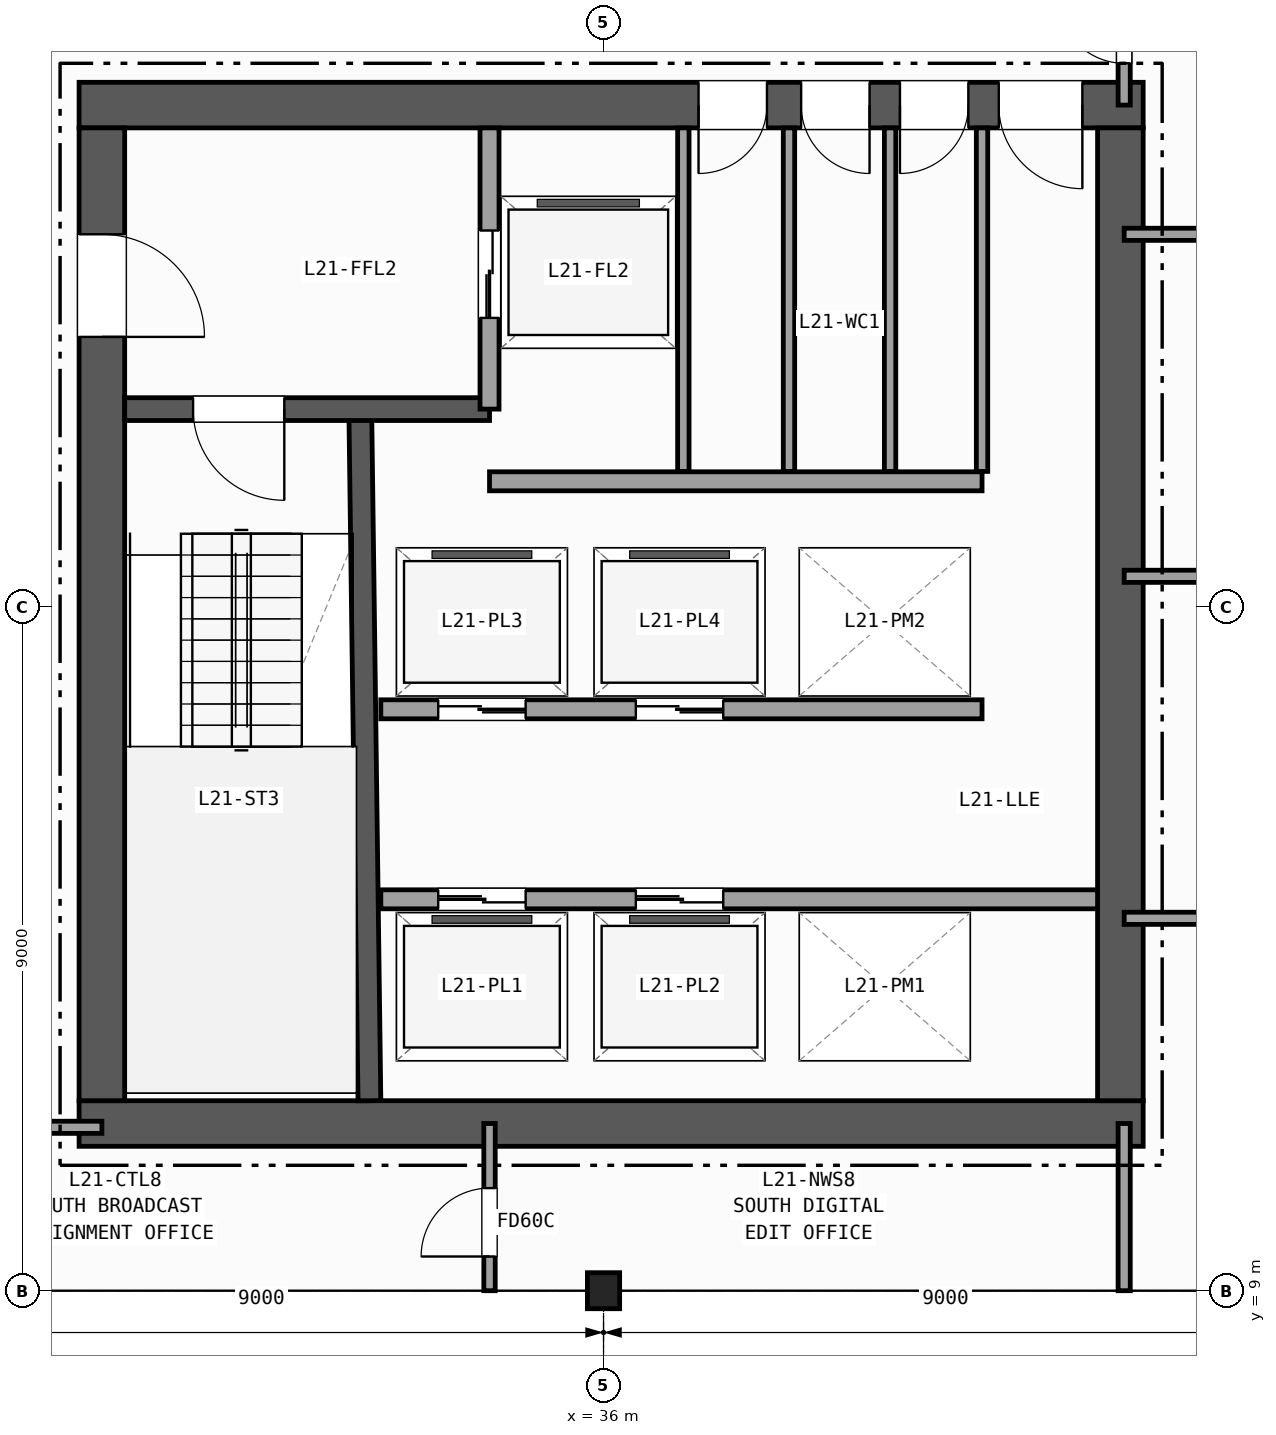
"""IFC4 building model, lengths in metres.
Left out: names, types, materials, properties, quantities, classifications, styles, units other than length and angle.
Written with IfcOpenShell. Run it as: python <this file> out.ifc"""

import sys

from ifc_helpers import new_model, si_unit, direction, frame, frame_2d, origin, origin_2d, place, context, subcontext, project, spatial, rectangle, i_section, extrude, element, fill, save


model = new_model("IFC4")
c1 = context("Model", 3, precision=1e-05, world=origin(), true_north=direction((0.0, 1.0)))
c2 = subcontext(c1, "Body", "Model", "MODEL_VIEW")
j1 = project(units=[si_unit("LENGTHUNIT", "METRE"), si_unit("PLANEANGLEUNIT", "RADIAN")], contexts=[c1])
p1 = place(None, origin())
s1 = spatial("IfcSite", under=j1, at=p1, CompositionType="ELEMENT")
p2 = place(p1, origin())
s2 = spatial("IfcBuilding", under=s1, at=p2, CompositionType="ELEMENT")
p3 = place(p2, frame((0.0, 0.0, 89.1)))
s3 = spatial("IfcBuildingStorey", under=s2, at=p3, CompositionType="ELEMENT", Elevation=89.1)
p4 = place(p3, frame((36.0, 9.0, 0.0), z_axis=(0.0, 0.0, 1.0), x_axis=(1.0, 0.0, 0.0)))
e1 = element("IfcColumn", 1, at=p4, inside=s3, PredefinedType="COLUMN", context=c2, shape_type="SweptSolid", body=[
    extrude(i_section(OverallWidth=0.424, OverallDepth=0.474, WebThickness=0.048, FlangeThickness=0.077, FilletRadius=0.015, at=origin_2d()), origin(), (0.0, 0.0, 1.0), 3.7),
])
p5 = place(p3, frame((29.1, 11.2, 0.0), z_axis=(0.0, 0.0, 1.0), x_axis=(1.0, 0.0, 0.0)))
e2 = element("IfcWall", 2, at=p5, inside=s3, PredefinedType="SHEAR", context=c2, shape_type="SweptSolid", body=[
    extrude(rectangle(XDim=14.0, YDim=0.6, at=frame_2d((7.0, 0.0))), origin(), (0.0, 0.0, 1.0), 3.42),
])
p6 = place(p3, frame((43.1, 24.6, 0.0), z_axis=(0.0, 0.0, 1.0), x_axis=(-1.0, 0.0, 0.0)))
e3 = element("IfcWall", 3, at=p6, inside=s3, PredefinedType="SHEAR", context=c2, shape_type="SweptSolid", body=[
    extrude(rectangle(XDim=14.0, YDim=0.6, at=frame_2d((7.0, 0.0))), origin(), (0.0, 0.0, 1.0), 3.42),
])
p7 = place(p6, frame((0.8, 0.0, 0.0)))
e4 = element("IfcOpeningElement", 4, at=p7, cuts=e3, PredefinedType="OPENING", context=c2, shape_type="SweptSolid", body=[
    extrude(rectangle(XDim=1.1, YDim=2.15, at=frame_2d((0.55, 1.075))), frame((0.0, 0.31, 0.0), z_axis=(0.0, -1.0, 0.0), x_axis=(1.0, 0.0, 0.0)), (0.0, 0.0, 1.0), 0.62),
])
p8 = place(p6, frame((2.3, 0.0, 0.0)))
e5 = element("IfcOpeningElement", 5, at=p8, cuts=e3, PredefinedType="OPENING", context=c2, shape_type="SweptSolid", body=[
    extrude(rectangle(XDim=0.9, YDim=2.1, at=frame_2d((0.45, 1.05))), frame((0.0, 0.31, 0.0), z_axis=(0.0, -1.0, 0.0), x_axis=(1.0, 0.0, 0.0)), (0.0, 0.0, 1.0), 0.62),
])
p9 = place(p6, frame((3.6, 0.0, 0.0)))
e6 = element("IfcOpeningElement", 6, at=p9, cuts=e3, PredefinedType="OPENING", context=c2, shape_type="SweptSolid", body=[
    extrude(rectangle(XDim=0.9, YDim=2.1, at=frame_2d((0.45, 1.05))), frame((0.0, 0.31, 0.0), z_axis=(0.0, -1.0, 0.0), x_axis=(1.0, 0.0, 0.0)), (0.0, 0.0, 1.0), 0.62),
])
p10 = place(p6, frame((4.95, 0.0, 0.0)))
e7 = element("IfcOpeningElement", 7, at=p10, cuts=e3, PredefinedType="OPENING", context=c2, shape_type="SweptSolid", body=[
    extrude(rectangle(XDim=0.9, YDim=2.1, at=frame_2d((0.45, 1.05))), frame((0.0, 0.31, 0.0), z_axis=(0.0, -1.0, 0.0), x_axis=(1.0, 0.0, 0.0)), (0.0, 0.0, 1.0), 0.62),
])
p11 = place(p3, frame((29.4, 24.3, 0.0), z_axis=(0.0, 0.0, 1.0), x_axis=(0.0, -1.0, 0.0)))
e8 = element("IfcWall", 8, at=p11, inside=s3, PredefinedType="SHEAR", context=c2, shape_type="SweptSolid", body=[
    extrude(rectangle(XDim=12.8, YDim=0.6, at=frame_2d((6.4, 0.0))), origin(), (0.0, 0.0, 1.0), 3.42),
])
p12 = place(p11, frame((1.4, 0.0, 0.0)))
e9 = element("IfcOpeningElement", 9, at=p12, cuts=e8, PredefinedType="OPENING", context=c2, shape_type="SweptSolid", body=[
    extrude(rectangle(XDim=1.35, YDim=2.15, at=frame_2d((0.675, 1.075))), frame((0.0, 0.31, 0.0), z_axis=(0.0, -1.0, 0.0), x_axis=(1.0, 0.0, 0.0)), (0.0, 0.0, 1.0), 0.62),
])
p13 = place(p3, frame((42.8, 11.5, 0.0), z_axis=(0.0, 0.0, 1.0), x_axis=(0.0, 1.0, 0.0)))
e10 = element("IfcWall", 10, at=p13, inside=s3, PredefinedType="SHEAR", context=c2, shape_type="SweptSolid", body=[
    extrude(rectangle(XDim=12.8, YDim=0.6, at=frame_2d((6.4, 0.0))), origin(), (0.0, 0.0, 1.0), 3.42),
])
p14 = place(p3, frame((32.92, 11.5, 0.0), z_axis=(0.0, 0.0, 1.0), x_axis=(-0.013244407292, 0.999912288991, 0.0)))
e11 = element("IfcWall", 11, at=p14, inside=s3, PredefinedType="SHEAR", context=c2, shape_type="SweptSolid", body=[
    extrude(rectangle(XDim=9.051, YDim=0.3, at=frame_2d((4.525, 0.0))), origin(), (0.0, 0.0, 1.0), 3.42),
])
p15 = place(p3, frame((34.5, 20.6, 0.0), z_axis=(0.0, 0.0, 1.0), x_axis=(-1.0, 0.0, 0.0)))
e12 = element("IfcWall", 12, at=p15, inside=s3, PredefinedType="SHEAR", context=c2, shape_type="SweptSolid", body=[
    extrude(rectangle(XDim=4.8, YDim=0.3, at=frame_2d((2.4, 0.0))), origin(), (0.0, 0.0, 1.0), 3.42),
])
p16 = place(p15, frame((2.7, 0.0, 0.0)))
e13 = element("IfcOpeningElement", 13, at=p16, cuts=e12, PredefinedType="OPENING", context=c2, shape_type="SweptSolid", body=[
    extrude(rectangle(XDim=1.2, YDim=2.15, at=frame_2d((0.6, 1.075))), frame((0.0, 0.16, 0.0), z_axis=(0.0, -1.0, 0.0), x_axis=(1.0, 0.0, 0.0)), (0.0, 0.0, 1.0), 0.32),
])
p17 = place(p3, frame((34.5, 20.6, 0.0), z_axis=(0.0, 0.0, 1.0), x_axis=(0.0, 1.0, 0.0)))
e14 = element("IfcWall", 14, at=p17, inside=s3, PredefinedType="PARTITIONING", context=c2, shape_type="SweptSolid", body=[
    extrude(rectangle(XDim=3.7, YDim=0.25, at=frame_2d((1.85, 0.0))), origin(), (0.0, 0.0, 1.0), 3.42),
])
p18 = place(p17, frame((1.2, 0.0, 0.0)))
e15 = element("IfcOpeningElement", 15, at=p18, cuts=e14, PredefinedType="OPENING", context=c2, shape_type="SweptSolid", body=[
    extrude(rectangle(XDim=1.15, YDim=2.15, at=frame_2d((0.575, 1.075))), frame((0.0, 0.135, 0.0), z_axis=(0.0, -1.0, 0.0), x_axis=(1.0, 0.0, 0.0)), (0.0, 0.0, 1.0), 0.27),
])
p19 = place(p3, frame((34.5, 19.65, 0.0), z_axis=(0.0, 0.0, 1.0), x_axis=(1.0, 0.0, 0.0)))
e16 = element("IfcWall", 16, at=p19, inside=s3, PredefinedType="PARTITIONING", context=c2, shape_type="SweptSolid", body=[
    extrude(rectangle(XDim=6.48, YDim=0.25, at=frame_2d((3.24, 0.0))), origin(), (0.0, 0.0, 1.0), 3.42),
])
p20 = place(p3, frame((33.07, 14.15, 0.0), z_axis=(0.0, 0.0, 1.0), x_axis=(1.0, 0.0, 0.0)))
e17 = element("IfcWall", 17, at=p20, inside=s3, PredefinedType="PARTITIONING", context=c2, shape_type="SweptSolid", body=[
    extrude(rectangle(XDim=9.43, YDim=0.25, at=frame_2d((4.715, 0.0))), origin(), (0.0, 0.0, 1.0), 3.42),
])
p21 = place(p20, frame((0.755, 0.0, 0.0)))
e18 = element("IfcOpeningElement", 18, at=p21, cuts=e17, PredefinedType="OPENING", context=c2, shape_type="SweptSolid", body=[
    extrude(rectangle(XDim=1.15, YDim=2.15, at=frame_2d((0.575, 1.075))), frame((0.0, 0.135, 0.0), z_axis=(0.0, -1.0, 0.0), x_axis=(1.0, 0.0, 0.0)), (0.0, 0.0, 1.0), 0.27),
])
p22 = place(p20, frame((3.355, 0.0, 0.0)))
e19 = element("IfcOpeningElement", 19, at=p22, cuts=e17, PredefinedType="OPENING", context=c2, shape_type="SweptSolid", body=[
    extrude(rectangle(XDim=1.15, YDim=2.15, at=frame_2d((0.575, 1.075))), frame((0.0, 0.135, 0.0), z_axis=(0.0, -1.0, 0.0), x_axis=(1.0, 0.0, 0.0)), (0.0, 0.0, 1.0), 0.27),
])
p23 = place(p3, frame((40.98, 16.65, 0.0), z_axis=(0.0, 0.0, 1.0), x_axis=(-1.0, 0.0, 0.0)))
e20 = element("IfcWall", 20, at=p23, inside=s3, PredefinedType="PARTITIONING", context=c2, shape_type="SweptSolid", body=[
    extrude(rectangle(XDim=7.91, YDim=0.25, at=frame_2d((3.955, 0.0))), origin(), (0.0, 0.0, 1.0), 3.42),
])
p24 = place(p23, frame((6.005, 0.0, 0.0)))
e21 = element("IfcOpeningElement", 21, at=p24, cuts=e20, PredefinedType="OPENING", context=c2, shape_type="SweptSolid", body=[
    extrude(rectangle(XDim=1.15, YDim=2.15, at=frame_2d((0.575, 1.075))), frame((0.0, 0.135, 0.0), z_axis=(0.0, -1.0, 0.0), x_axis=(1.0, 0.0, 0.0)), (0.0, 0.0, 1.0), 0.27),
])
p25 = place(p23, frame((3.405, 0.0, 0.0)))
e22 = element("IfcOpeningElement", 22, at=p25, cuts=e20, PredefinedType="OPENING", context=c2, shape_type="SweptSolid", body=[
    extrude(rectangle(XDim=1.15, YDim=2.15, at=frame_2d((0.575, 1.075))), frame((0.0, 0.135, 0.0), z_axis=(0.0, -1.0, 0.0), x_axis=(1.0, 0.0, 0.0)), (0.0, 0.0, 1.0), 0.27),
])
for number, where, z_axis, x_axis in (
    (23, (37.05, 19.78, 0.0), (0.0, 0.0, 1.0), (0.0, 1.0, 0.0)),
    (24, (38.44, 19.78, 0.0), (0.0, 0.0, 1.0), (0.0, 1.0, 0.0)),
    (25, (39.77, 19.78, 0.0), (0.0, 0.0, 1.0), (0.0, 1.0, 0.0)),
    (26, (40.98, 19.78, 0.0), (0.0, 0.0, 1.0), (0.0, 1.0, 0.0)),
):
    element("IfcWall", number, at=place(p3, frame(where, z_axis=z_axis, x_axis=x_axis)), inside=s3, PredefinedType="PARTITIONING", context=c2, shape_type="SweptSolid", body=[
        extrude(rectangle(XDim=4.52, YDim=0.15, at=frame_2d((2.26, 0.0))), origin(), (0.0, 0.0, 1.0), 3.42),
    ])
p26 = place(p3, frame((24.65, 11.15, 0.0), z_axis=(0.0, 0.0, 1.0), x_axis=(1.0, 0.0, 0.0)))
e27 = element("IfcWall", 27, at=p26, inside=s3, PredefinedType="PARTITIONING", context=c2, shape_type="SweptSolid", body=[
    extrude(rectangle(XDim=4.75, YDim=0.16, at=frame_2d((2.375, 0.0))), origin(), (0.0, 0.0, 1.0), 2.792),
])
p27 = place(p26, frame((1.2, 0.0, 0.0)))
e28 = element("IfcOpeningElement", 28, at=p27, cuts=e27, PredefinedType="OPENING", context=c2, shape_type="SweptSolid", body=[
    extrude(rectangle(XDim=1.05, YDim=2.15, at=frame_2d((0.525, 1.075))), frame((0.0, 0.09, 0.0), z_axis=(0.0, -1.0, 0.0), x_axis=(1.0, 0.0, 0.0)), (0.0, 0.0, 1.0), 0.18),
])
p28 = place(p3, frame((34.5, 9.0, 0.0), z_axis=(0.0, 0.0, 1.0), x_axis=(0.0, 1.0, 0.0)))
e29 = element("IfcWall", 29, at=p28, inside=s3, PredefinedType="PARTITIONING", context=c2, shape_type="SweptSolid", body=[
    extrude(rectangle(XDim=2.2, YDim=0.15, at=frame_2d((1.1, 0.0))), origin(), (0.0, 0.0, 1.0), 2.627),
])
p29 = place(p28, frame((0.45, 0.0, 0.0)))
e30 = element("IfcOpeningElement", 30, at=p29, cuts=e29, PredefinedType="OPENING", context=c2, shape_type="SweptSolid", body=[
    extrude(rectangle(XDim=0.9, YDim=2.1, at=frame_2d((0.45, 1.05))), frame((0.0, 0.085, 0.0), z_axis=(0.0, -1.0, 0.0), x_axis=(1.0, 0.0, 0.0)), (0.0, 0.0, 1.0), 0.17),
])
p30 = place(p3, frame((42.85, 9.0, 0.0), z_axis=(0.0, 0.0, 1.0), x_axis=(0.0, 1.0, 0.0)))
e31 = element("IfcWall", 31, at=p30, inside=s3, PredefinedType="PARTITIONING", context=c2, shape_type="SweptSolid", body=[
    extrude(rectangle(XDim=2.2, YDim=0.16, at=frame_2d((1.1, 0.0))), origin(), (0.0, 0.0, 1.0), 2.627),
])
p31 = place(p3, frame((42.85, 24.6, 0.0), z_axis=(0.0, 0.0, 1.0), x_axis=(0.0, 1.0, 0.0)))
e32 = element("IfcWall", 32, at=p31, inside=s3, PredefinedType="PARTITIONING", context=c2, shape_type="SweptSolid", body=[
    extrude(rectangle(XDim=2.4, YDim=0.16, at=frame_2d((1.2, 0.0))), origin(), (0.0, 0.0, 1.0), 2.627),
])
p32 = place(p31, frame((0.55, 0.0, 0.0)))
e33 = element("IfcOpeningElement", 33, at=p32, cuts=e32, PredefinedType="OPENING", context=c2, shape_type="SweptSolid", body=[
    extrude(rectangle(XDim=0.86, YDim=2.05, at=frame_2d((0.43, 1.025))), frame((0.0, 0.09, 0.0), z_axis=(0.0, -1.0, 0.0), x_axis=(1.0, 0.0, 0.0)), (0.0, 0.0, 1.0), 0.18),
])
p33 = place(p3, frame((42.85, 13.9, 0.0), z_axis=(0.0, 0.0, 1.0), x_axis=(1.0, 0.0, 0.0)))
e34 = element("IfcWall", 34, at=p33, inside=s3, PredefinedType="PARTITIONING", context=c2, shape_type="SweptSolid", body=[
    extrude(rectangle(XDim=20.428, YDim=0.16, at=frame_2d((10.214, 0.0))), origin(), (0.0, 0.0, 1.0), 3.42),
])
p34 = place(p33, frame((4.6, 0.0, 0.0)))
e35 = element("IfcOpeningElement", 35, at=p34, cuts=e34, PredefinedType="OPENING", context=c2, shape_type="SweptSolid", body=[
    extrude(rectangle(XDim=0.95, YDim=2.1, at=frame_2d((0.475, 1.05))), frame((0.0, 0.09, 0.0), z_axis=(0.0, -1.0, 0.0), x_axis=(1.0, 0.0, 0.0)), (0.0, 0.0, 1.0), 0.18),
])
p35 = place(p3, frame((42.85, 18.4, 0.0), z_axis=(0.0, 0.0, 1.0), x_axis=(1.0, 0.0, 0.0)))
e36 = element("IfcWall", 36, at=p35, inside=s3, PredefinedType="PARTITIONING", context=c2, shape_type="SweptSolid", body=[
    extrude(rectangle(XDim=20.809, YDim=0.16, at=frame_2d((10.404, 0.0))), origin(), (0.0, 0.0, 1.0), 3.42),
])
p36 = place(p35, frame((4.6, 0.0, 0.0)))
e37 = element("IfcOpeningElement", 37, at=p36, cuts=e36, PredefinedType="OPENING", context=c2, shape_type="SweptSolid", body=[
    extrude(rectangle(XDim=1.0, YDim=2.1, at=frame_2d((0.5, 1.05))), frame((0.0, 0.09, 0.0), z_axis=(0.0, -1.0, 0.0), x_axis=(1.0, 0.0, 0.0)), (0.0, 0.0, 1.0), 0.18),
])
p37 = place(p3, frame((42.85, 22.9, 0.0), z_axis=(0.0, 0.0, 1.0), x_axis=(1.0, 0.0, 0.0)))
e38 = element("IfcWall", 38, at=p37, inside=s3, PredefinedType="PARTITIONING", context=c2, shape_type="SweptSolid", body=[
    extrude(rectangle(XDim=20.346, YDim=0.16, at=frame_2d((10.173, 0.0))), origin(), (0.0, 0.0, 1.0), 3.42),
])
p38 = place(p37, frame((4.6, 0.0, 0.0)))
e39 = element("IfcOpeningElement", 39, at=p38, cuts=e38, PredefinedType="OPENING", context=c2, shape_type="SweptSolid", body=[
    extrude(rectangle(XDim=1.05, YDim=2.15, at=frame_2d((0.525, 1.075))), frame((0.0, 0.09, 0.0), z_axis=(0.0, -1.0, 0.0), x_axis=(1.0, 0.0, 0.0)), (0.0, 0.0, 1.0), 0.18),
])
p39 = place(p16, origin())
e40 = element("IfcDoor", 40, at=p39, inside=s3, OperationType="SINGLE_SWING_LEFT", PredefinedType="DOOR", context=c2, shape_type="SweptSolid", body=[
    extrude(rectangle(XDim=1.2, YDim=2.15, at=frame_2d((0.6, 1.075))), frame((0.0, 0.025, 0.0), z_axis=(0.0, -1.0, 0.0), x_axis=(1.0, 0.0, 0.0)), (0.0, 0.0, 1.0), 0.05),
])
fill(e13, e40)
p40 = place(p12, origin())
e41 = element("IfcDoor", 41, at=p40, inside=s3, OperationType="SINGLE_SWING_RIGHT", PredefinedType="DOOR", context=c2, shape_type="SweptSolid", body=[
    extrude(rectangle(XDim=1.35, YDim=2.15, at=frame_2d((0.675, 1.075))), frame((0.0, 0.025, 0.0), z_axis=(0.0, -1.0, 0.0), x_axis=(1.0, 0.0, 0.0)), (0.0, 0.0, 1.0), 0.05),
])
fill(e9, e41)
p41 = place(p7, origin())
e42 = element("IfcDoor", 42, at=p41, inside=s3, OperationType="SINGLE_SWING_LEFT", PredefinedType="DOOR", context=c2, shape_type="SweptSolid", body=[
    extrude(rectangle(XDim=1.1, YDim=2.15, at=frame_2d((0.55, 1.075))), frame((0.0, 0.025, 0.0), z_axis=(0.0, -1.0, 0.0), x_axis=(1.0, 0.0, 0.0)), (0.0, 0.0, 1.0), 0.05),
])
fill(e4, e42)
p42 = place(p8, origin())
e43 = element("IfcDoor", 43, at=p42, inside=s3, OperationType="SINGLE_SWING_RIGHT", PredefinedType="DOOR", context=c2, shape_type="SweptSolid", body=[
    extrude(rectangle(XDim=0.9, YDim=2.1, at=frame_2d((0.45, 1.05))), frame((0.0, 0.025, 0.0), z_axis=(0.0, -1.0, 0.0), x_axis=(1.0, 0.0, 0.0)), (0.0, 0.0, 1.0), 0.05),
])
fill(e5, e43)
p43 = place(p9, origin())
e44 = element("IfcDoor", 44, at=p43, inside=s3, OperationType="SINGLE_SWING_LEFT", PredefinedType="DOOR", context=c2, shape_type="SweptSolid", body=[
    extrude(rectangle(XDim=0.9, YDim=2.1, at=frame_2d((0.45, 1.05))), frame((0.0, 0.025, 0.0), z_axis=(0.0, -1.0, 0.0), x_axis=(1.0, 0.0, 0.0)), (0.0, 0.0, 1.0), 0.05),
])
fill(e6, e44)
p44 = place(p10, origin())
e45 = element("IfcDoor", 45, at=p44, inside=s3, OperationType="SINGLE_SWING_RIGHT", PredefinedType="DOOR", context=c2, shape_type="SweptSolid", body=[
    extrude(rectangle(XDim=0.9, YDim=2.1, at=frame_2d((0.45, 1.05))), frame((0.0, 0.025, 0.0), z_axis=(0.0, -1.0, 0.0), x_axis=(1.0, 0.0, 0.0)), (0.0, 0.0, 1.0), 0.05),
])
fill(e7, e45)
p45 = place(p18, origin())
e46 = element("IfcDoor", 46, at=p45, inside=s3, OperationType="DOUBLE_DOOR_SLIDING", PredefinedType="DOOR", context=c2, shape_type="SweptSolid", body=[
    extrude(rectangle(XDim=1.15, YDim=2.15, at=frame_2d((0.575, 1.075))), frame((0.0, 0.025, 0.0), z_axis=(0.0, -1.0, 0.0), x_axis=(1.0, 0.0, 0.0)), (0.0, 0.0, 1.0), 0.05),
])
fill(e15, e46)
p46 = place(p21, origin())
e47 = element("IfcDoor", 47, at=p46, inside=s3, OperationType="DOUBLE_DOOR_SLIDING", PredefinedType="DOOR", context=c2, shape_type="SweptSolid", body=[
    extrude(rectangle(XDim=1.15, YDim=2.15, at=frame_2d((0.575, 1.075))), frame((0.0, 0.025, 0.0), z_axis=(0.0, -1.0, 0.0), x_axis=(1.0, 0.0, 0.0)), (0.0, 0.0, 1.0), 0.05),
])
fill(e18, e47)
p47 = place(p22, origin())
e48 = element("IfcDoor", 48, at=p47, inside=s3, OperationType="DOUBLE_DOOR_SLIDING", PredefinedType="DOOR", context=c2, shape_type="SweptSolid", body=[
    extrude(rectangle(XDim=1.15, YDim=2.15, at=frame_2d((0.575, 1.075))), frame((0.0, 0.025, 0.0), z_axis=(0.0, -1.0, 0.0), x_axis=(1.0, 0.0, 0.0)), (0.0, 0.0, 1.0), 0.05),
])
fill(e19, e48)
p48 = place(p24, origin())
e49 = element("IfcDoor", 49, at=p48, inside=s3, OperationType="DOUBLE_DOOR_SLIDING", PredefinedType="DOOR", context=c2, shape_type="SweptSolid", body=[
    extrude(rectangle(XDim=1.15, YDim=2.15, at=frame_2d((0.575, 1.075))), frame((0.0, 0.025, 0.0), z_axis=(0.0, -1.0, 0.0), x_axis=(1.0, 0.0, 0.0)), (0.0, 0.0, 1.0), 0.05),
])
fill(e21, e49)
p49 = place(p25, origin())
e50 = element("IfcDoor", 50, at=p49, inside=s3, OperationType="DOUBLE_DOOR_SLIDING", PredefinedType="DOOR", context=c2, shape_type="SweptSolid", body=[
    extrude(rectangle(XDim=1.15, YDim=2.15, at=frame_2d((0.575, 1.075))), frame((0.0, 0.025, 0.0), z_axis=(0.0, -1.0, 0.0), x_axis=(1.0, 0.0, 0.0)), (0.0, 0.0, 1.0), 0.05),
])
fill(e22, e50)
p50 = place(p29, origin())
e51 = element("IfcDoor", 51, at=p50, inside=s3, OperationType="SINGLE_SWING_LEFT", PredefinedType="DOOR", context=c2, shape_type="SweptSolid", body=[
    extrude(rectangle(XDim=0.9, YDim=2.1, at=frame_2d((0.45, 1.05))), frame((0.0, 0.025, 0.0), z_axis=(0.0, -1.0, 0.0), x_axis=(1.0, 0.0, 0.0)), (0.0, 0.0, 1.0), 0.05),
])
fill(e30, e51)
p51 = place(p32, origin())
e52 = element("IfcDoor", 52, at=p51, inside=s3, OperationType="SINGLE_SWING_RIGHT", PredefinedType="DOOR", context=c2, shape_type="SweptSolid", body=[
    extrude(rectangle(XDim=0.86, YDim=2.05, at=frame_2d((0.43, 1.025))), frame((0.0, 0.025, 0.0), z_axis=(0.0, -1.0, 0.0), x_axis=(1.0, 0.0, 0.0)), (0.0, 0.0, 1.0), 0.05),
])
fill(e33, e52)
save(model, sys.argv[1])
